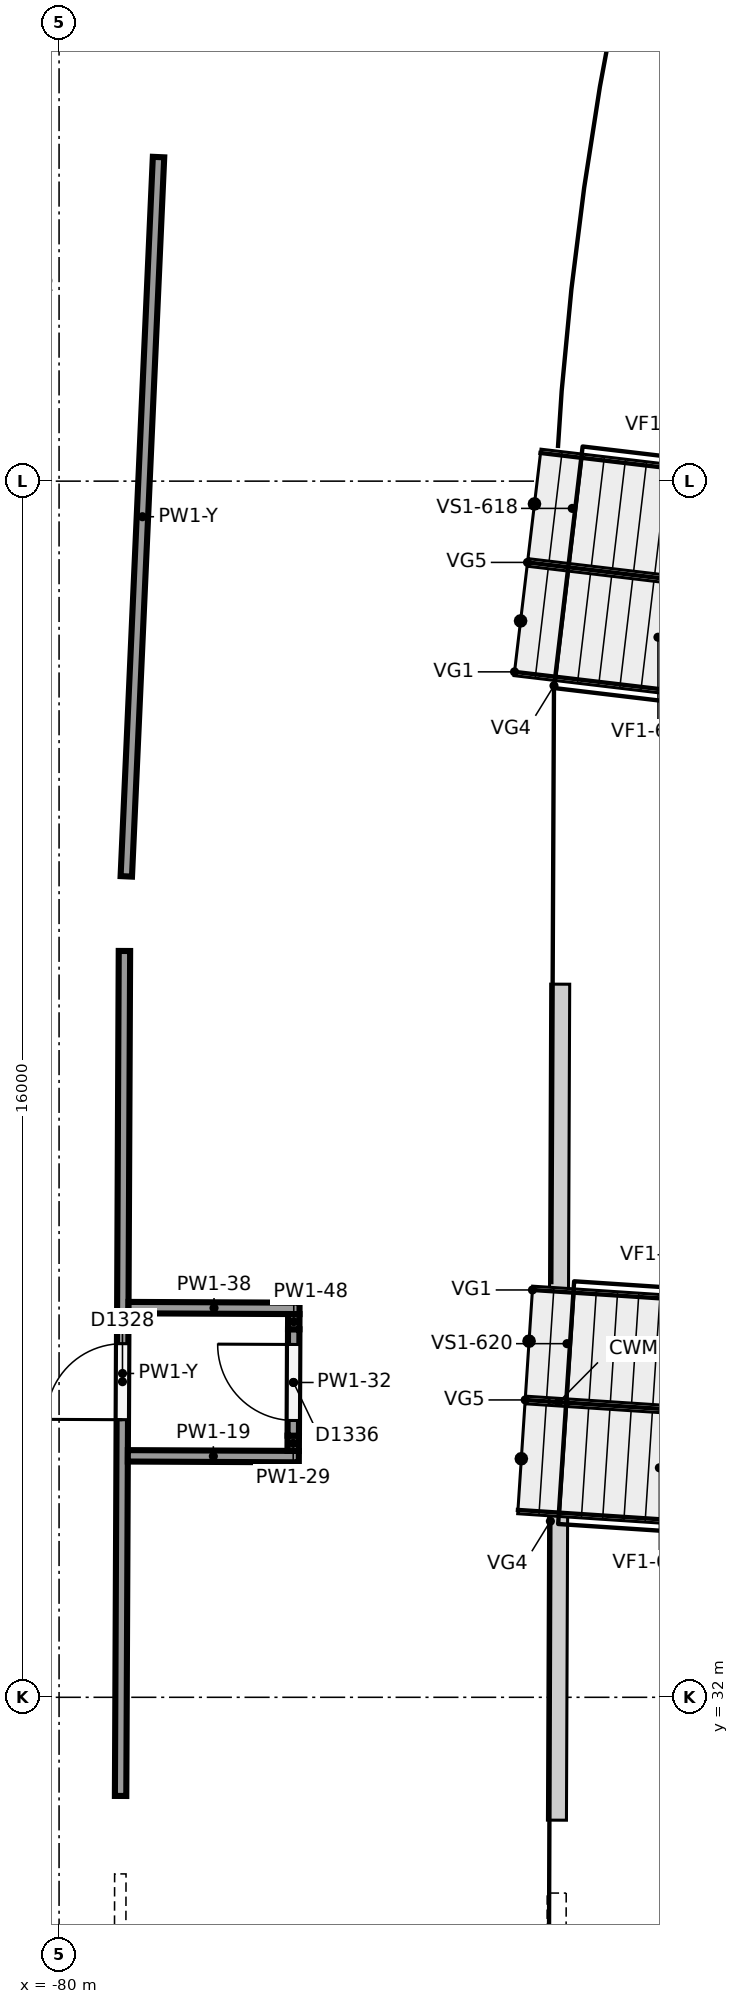
"""IFC4 building model, lengths in metres.
Left out: names, types, materials, properties, quantities, classifications, styles, units other than length and angle.
Written with IfcOpenShell. Run it as: python <this file> out.ifc"""

import sys

from ifc_helpers import new_model, si_unit, direction, frame, frame_2d, origin, origin_2d, place, context, subcontext, project, spatial, rectangle, circle, extrude, element, fill, save


model = new_model("IFC4")
c1 = context("Model", 3, precision=1e-05, world=origin(), true_north=direction((0.0, 1.0)))
c2 = subcontext(c1, "Body", "Model", "MODEL_VIEW")
j1 = project(units=[si_unit("LENGTHUNIT", "METRE"), si_unit("PLANEANGLEUNIT", "RADIAN")], contexts=[c1])
p1 = place(None, origin())
s1 = spatial("IfcSite", under=j1, at=p1, CompositionType="ELEMENT")
p2 = place(p1, origin())
s2 = spatial("IfcBuilding", under=s1, at=p2, CompositionType="ELEMENT")
p3 = place(p2, frame((0.0, 0.0, 18.0)))
s3 = spatial("IfcBuildingStorey", under=s2, at=p3, CompositionType="ELEMENT", Elevation=18.0)
p4 = place(p3, frame((-72.992, 51.847, 0.0), z_axis=(0.0, 0.0, 1.0), x_axis=(1.0, 0.0, 0.0)))
e1 = element("IfcColumn", 1, at=p4, inside=s3, PredefinedType="COLUMN", context=c2, shape_type="SweptSolid", body=[
    extrude(circle(Radius=0.45, at=origin_2d()), origin(), (0.0, 0.0, 1.0), 3.881),
])
p5 = place(p3, frame((-73.405, 41.862, 0.0), z_axis=(0.0, 0.0, 1.0), x_axis=(1.0, 0.0, 0.0)))
e2 = element("IfcColumn", 2, at=p5, inside=s3, PredefinedType="COLUMN", context=c2, shape_type="SweptSolid", body=[
    extrude(circle(Radius=0.45, at=origin_2d()), origin(), (0.0, 0.0, 1.0), 3.88),
])
p6 = place(p3, frame((-73.451, 29.904, 0.0), z_axis=(0.0, 0.0, 1.0), x_axis=(1.0, 0.0, 0.0)))
e3 = element("IfcColumn", 3, at=p6, inside=s3, PredefinedType="COLUMN", context=c2, shape_type="SweptSolid", body=[
    extrude(circle(Radius=0.45, at=origin_2d()), origin(), (0.0, 0.0, 1.0), 3.804),
])
p7 = place(p3, frame((-79.19, 30.702, 0.0), z_axis=(0.0, 0.0, 1.0), x_axis=(0.004546006523, 0.999989666859, 0.0)))
e4 = element("IfcWall", 4, at=p7, inside=s3, PredefinedType="PARTITIONING", context=c2, shape_type="SweptSolid", body=[
    extrude(rectangle(XDim=11.117, YDim=0.15, at=frame_2d((5.558, 0.0))), origin(), (0.0, 0.0, 1.0), 3.347),
])
p8 = place(p7, frame((4.95, 0.0, 0.0)))
e5 = element("IfcOpeningElement", 5, at=p8, cuts=e4, PredefinedType="OPENING", context=c2, shape_type="SweptSolid", body=[
    extrude(rectangle(XDim=1.0, YDim=2.1, at=frame_2d((0.5, 1.05))), frame((0.0, 0.085, 0.0), z_axis=(0.0, -1.0, 0.0), x_axis=(1.0, 0.0, 0.0)), (0.0, 0.0, 1.0), 0.17),
])
p9 = place(p3, frame((-79.115, 42.8, 0.0), z_axis=(0.0, 0.0, 1.0), x_axis=(0.044768155876, 0.99899740351, 0.0)))
e6 = element("IfcWall", 6, at=p9, inside=s3, PredefinedType="PARTITIONING", context=c2, shape_type="SweptSolid", body=[
    extrude(rectangle(XDim=9.473, YDim=0.15, at=frame_2d((4.736, 0.0))), origin(), (0.0, 0.0, 1.0), 3.347),
])
p10 = place(p3, frame((-79.219, 18.845, 0.0), z_axis=(0.0, 0.0, 1.0), x_axis=(0.002254023351, 0.999997459686, 0.0)))
e7 = element("IfcWall", 7, at=p10, inside=s3, PredefinedType="PARTITIONING", context=c2, shape_type="SweptSolid", body=[
    extrude(rectangle(XDim=10.831, YDim=0.15, at=frame_2d((5.416, 0.0))), origin(), (0.0, 0.0, 1.0), 3.499),
])
p11 = place(p3, frame((-79.095, 35.177, 0.0), z_axis=(0.0, 0.0, 1.0), x_axis=(0.999989615708, -0.004557244342, 0.0)))
e8 = element("IfcWall", 8, at=p11, inside=s3, PredefinedType="PARTITIONING", context=c2, shape_type="SweptSolid", body=[
    extrude(rectangle(XDim=2.25, YDim=0.15, at=frame_2d((1.125, 0.0))), origin(), (0.0, 0.0, 1.0), 5.614),
])
p12 = place(p3, frame((-79.086, 37.127, 0.0), z_axis=(0.0, 0.0, 1.0), x_axis=(0.999990104304, -0.004448740698, 0.0)))
e9 = element("IfcWall", 9, at=p12, inside=s3, PredefinedType="PARTITIONING", context=c2, shape_type="SweptSolid", body=[
    extrude(rectangle(XDim=2.25, YDim=0.15, at=frame_2d((1.125, 0.0))), origin(), (0.0, 0.0, 1.0), 5.688),
])
p13 = place(p3, frame((-76.92, 35.242, 0.0), z_axis=(0.0, 0.0, 1.0), x_axis=(0.004883946635, 0.999988073462, 0.0)))
e10 = element("IfcWall", 10, at=p13, inside=s3, PredefinedType="PARTITIONING", context=c2, shape_type="SweptSolid", body=[
    extrude(rectangle(XDim=0.2, YDim=0.15, at=frame_2d((0.1, 0.0))), origin(), (0.0, 0.0, 1.0), 5.663),
])
p14 = place(p3, frame((-76.919, 35.442, 0.0), z_axis=(0.0, 0.0, 1.0), x_axis=(0.004534309857, 0.999989719964, 0.0)))
e11 = element("IfcWall", 11, at=p14, inside=s3, PredefinedType="PARTITIONING", context=c2, shape_type="SweptSolid", body=[
    extrude(rectangle(XDim=1.4, YDim=0.15, at=frame_2d((0.7, 0.0))), origin(), (0.0, 0.0, 1.0), 5.671),
])
p15 = place(p14, frame((0.2, 0.0, 0.0)))
e12 = element("IfcOpeningElement", 12, at=p15, cuts=e11, PredefinedType="OPENING", context=c2, shape_type="SweptSolid", body=[
    extrude(rectangle(XDim=1.0, YDim=2.1, at=frame_2d((0.5, 1.05))), frame((0.0, 0.085, 0.0), z_axis=(0.0, -1.0, 0.0), x_axis=(1.0, 0.0, 0.0)), (0.0, 0.0, 1.0), 0.17),
])
p16 = place(p3, frame((-76.913, 36.842, 0.0), z_axis=(0.0, 0.0, 1.0), x_axis=(0.004877990744, 0.999988102532, 0.0)))
e13 = element("IfcWall", 13, at=p16, inside=s3, PredefinedType="PARTITIONING", context=c2, shape_type="SweptSolid", body=[
    extrude(rectangle(XDim=0.2, YDim=0.15, at=frame_2d((0.1, 0.0))), origin(), (0.0, 0.0, 1.0), 5.71),
])
p17 = place(p8, origin())
e14 = element("IfcDoor", 14, at=p17, inside=s3, OperationType="SINGLE_SWING_LEFT", PredefinedType="DOOR", context=c2, shape_type="SweptSolid", body=[
    extrude(rectangle(XDim=1.0, YDim=2.1, at=frame_2d((0.5, 1.05))), frame((0.0, 0.025, 0.0), z_axis=(0.0, -1.0, 0.0), x_axis=(1.0, 0.0, 0.0)), (0.0, 0.0, 1.0), 0.05),
])
fill(e5, e14)
p18 = place(p15, origin())
e15 = element("IfcDoor", 15, at=p18, inside=s3, OperationType="SINGLE_SWING_RIGHT", PredefinedType="DOOR", context=c2, shape_type="SweptSolid", body=[
    extrude(rectangle(XDim=1.0, YDim=2.1, at=frame_2d((0.5, 1.05))), frame((0.0, 0.025, 0.0), z_axis=(0.0, -1.0, 0.0), x_axis=(1.0, 0.0, 0.0)), (0.0, 0.0, 1.0), 0.05),
])
fill(e12, e15)
save(model, sys.argv[1])
